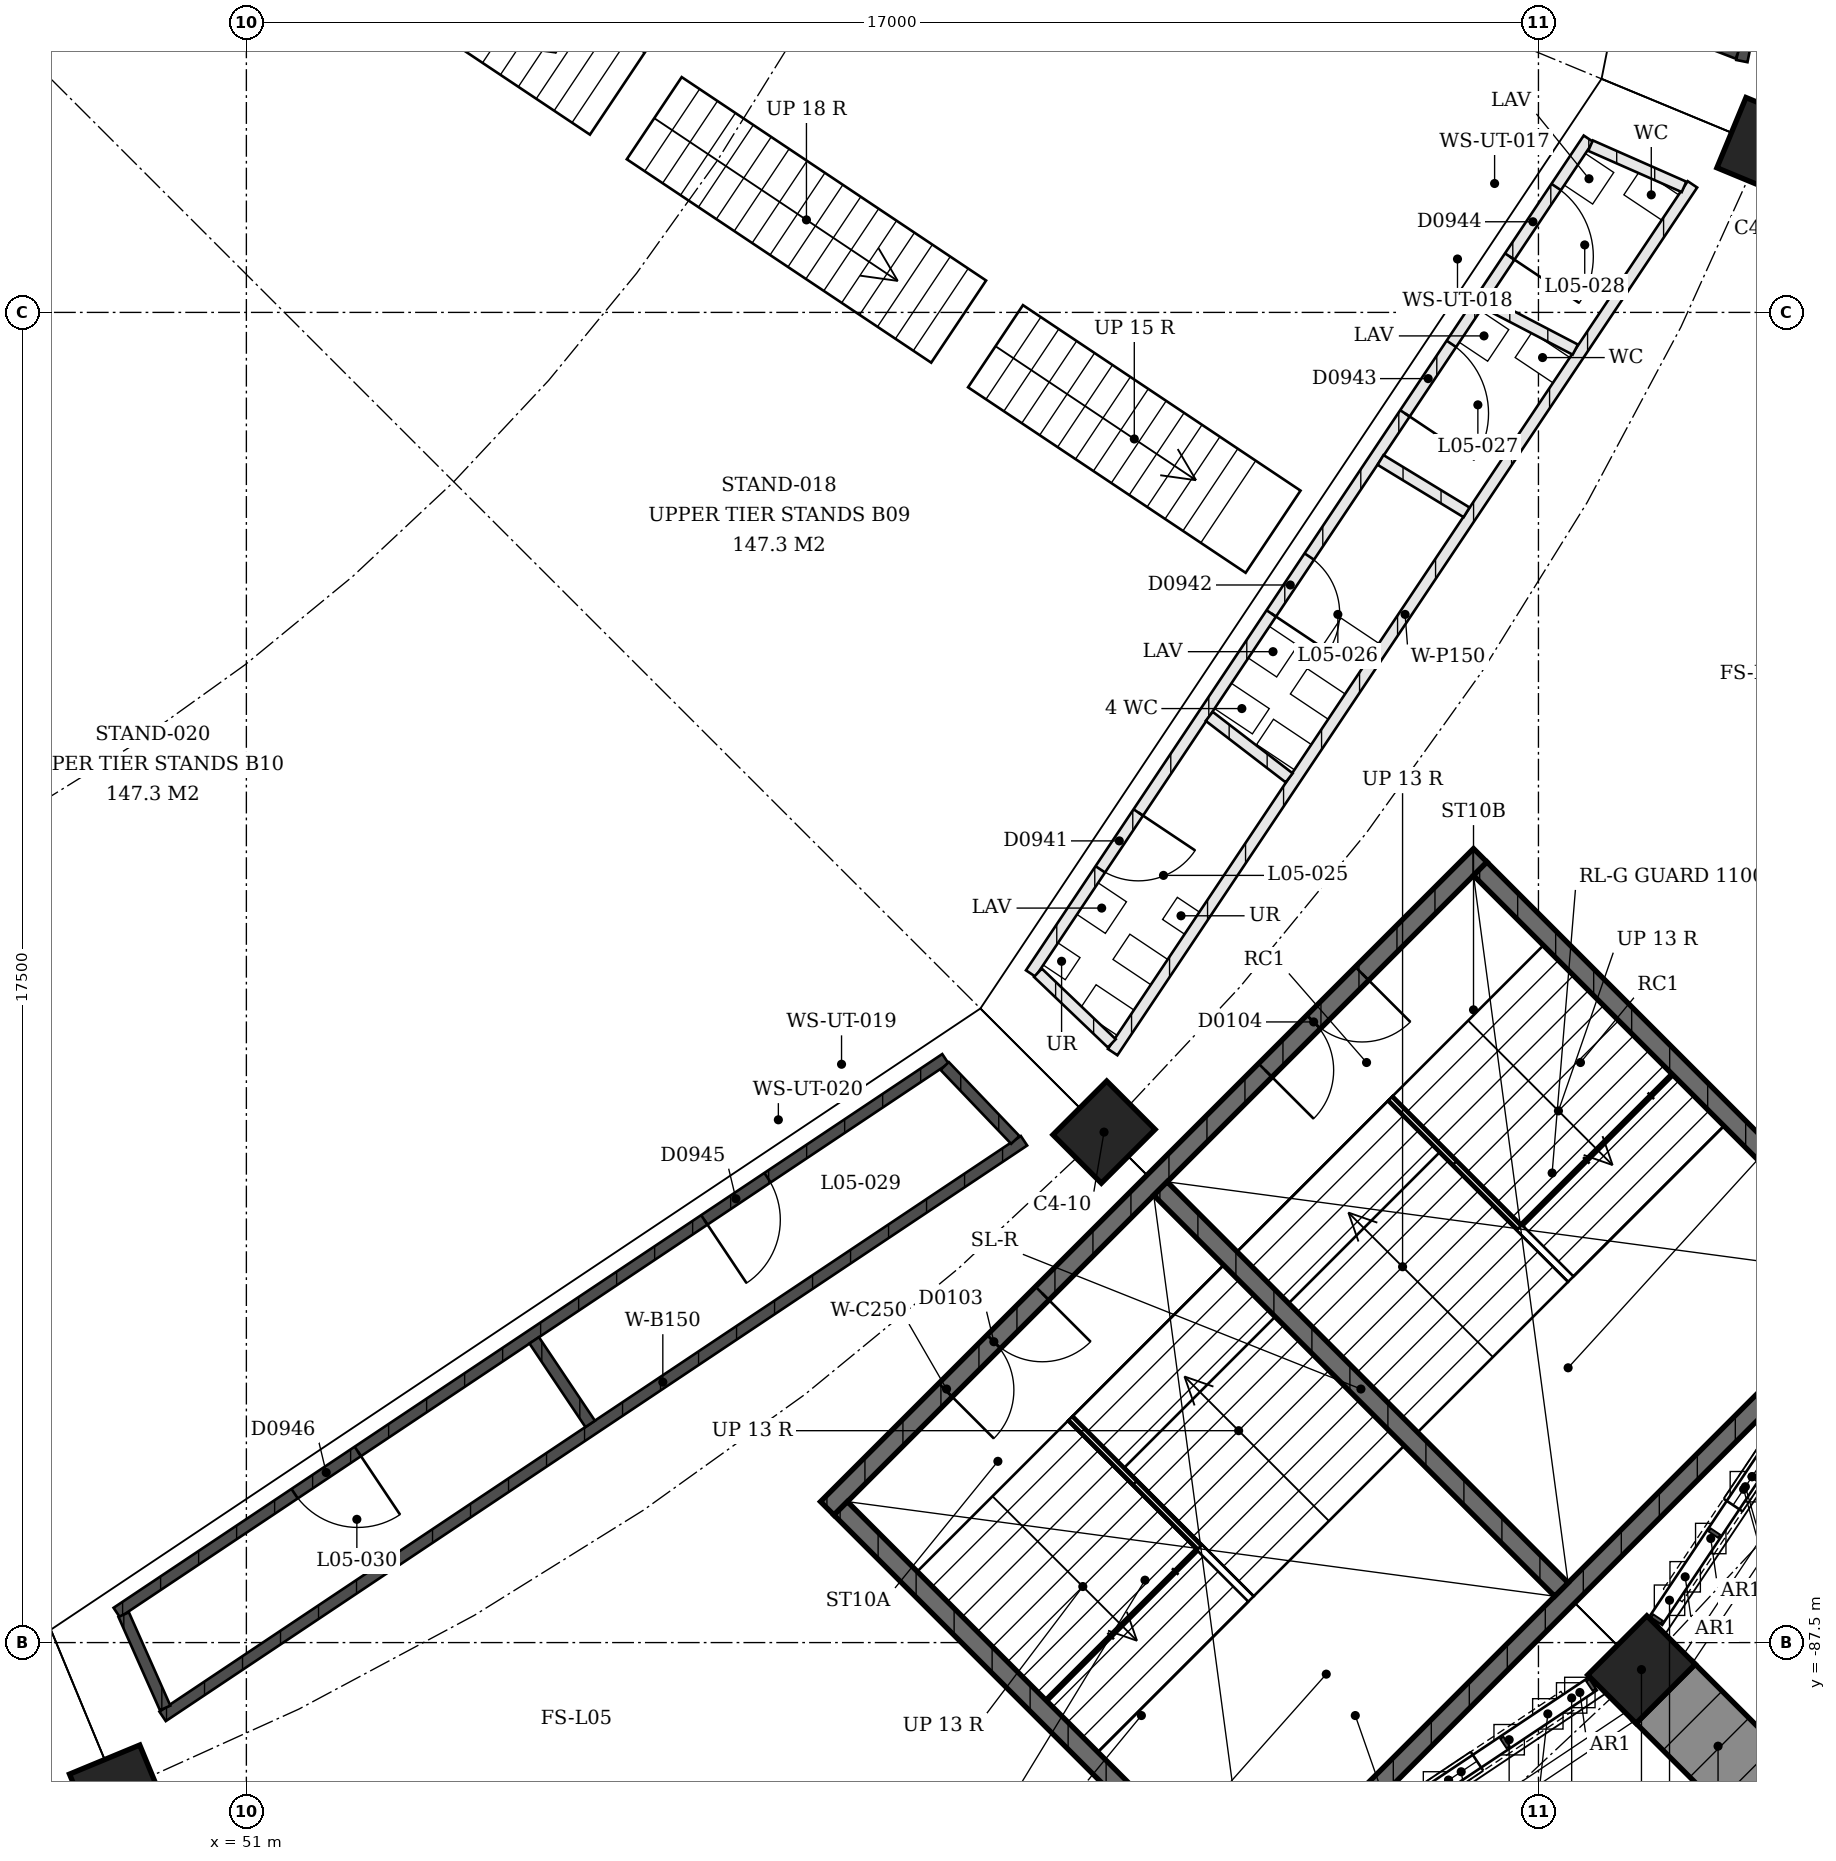
"""IFC4 building model, lengths in metres.
Left out: names, types, materials, properties, quantities, classifications, styles, units other than length and angle.
Written with IfcOpenShell. Run it as: python <this file> out.ifc"""

import sys

from ifc_helpers import new_model, si_unit, direction, frame, frame_2d, origin, origin_2d, place, context, subcontext, project, spatial, polyline, rectangle, outline, extrude, element, fill, save


model = new_model("IFC4")
c1 = context("Model", 3, precision=1e-05, world=origin(), true_north=direction((0.0, 1.0)))
c2 = subcontext(c1, "Body", "Model", "MODEL_VIEW")
j1 = project(units=[si_unit("LENGTHUNIT", "METRE"), si_unit("PLANEANGLEUNIT", "RADIAN")], contexts=[c1])
p1 = place(None, origin())
s1 = spatial("IfcSite", under=j1, at=p1, CompositionType="ELEMENT")
p2 = place(p1, origin())
s2 = spatial("IfcBuilding", under=s1, at=p2, CompositionType="ELEMENT")
p3 = place(p2, frame((0.0, 0.0, 22.5)))
s3 = spatial("IfcBuildingStorey", under=s2, at=p3, CompositionType="ELEMENT", Elevation=22.5)
for number, where, z_axis, x_axis in (
    (1, (70.955, -67.807, 0.0), (0.0, 0.0, 1.0), (0.383, 0.924, 0.0)),
    (2, (62.284, -80.784, 0.0), (0.0, 0.0, 1.0), (0.707, 0.707, 0.0)),
):
    element("IfcColumn", number, at=place(p3, frame(where, z_axis=z_axis, x_axis=x_axis)), inside=s3, PredefinedType="COLUMN", context=c2, shape_type="SweptSolid", body=[
        extrude(rectangle(XDim=1.0, YDim=0.9, at=origin_2d()), origin(), (0.0, 0.0, 1.0), 6.5),
    ])
p4 = place(p3, frame((69.355, -87.855, 0.0), z_axis=(0.0, 0.0, 1.0), x_axis=(0.707106781187, 0.707106781187, 0.0)))
e3 = element("IfcColumn", 3, at=p4, inside=s3, PredefinedType="COLUMN", context=c2, shape_type="SweptSolid", body=[
    extrude(rectangle(XDim=1.1, YDim=0.9, at=origin_2d()), origin(), (0.0, 0.0, 1.0), 6.5),
])
p5 = place(p3, frame((49.307, -89.455, 0.0), z_axis=(0.0, 0.0, 1.0), x_axis=(0.923879532511, 0.382683432365, 0.0)))
e4 = element("IfcColumn", 4, at=p5, inside=s3, PredefinedType="COLUMN", context=c2, shape_type="SweptSolid", body=[
    extrude(rectangle(XDim=1.0, YDim=0.9, at=origin_2d()), origin(), (0.0, 0.0, 1.0), 6.5),
])
p6 = place(p3, frame((71.854, -83.755, 4.1), z_axis=(0.0, 0.0, 1.0), x_axis=(-0.555554703021, -0.831479988906, 0.0)))
e5 = element("IfcWall", 5, at=p6, inside=s3, PredefinedType="SOLIDWALL", context=c2, shape_type="SweptSolid", body=[
    extrude(outline(polyline([(0.0, 0.0), (3.757, 0.0), (3.757, 0.05), (3.635, 1.311), (3.271, 2.577), (2.678, 3.754), (1.879, 4.8), (1.079, 3.754), (0.486, 2.577), (0.123, 1.311), (0.0, 0.05), (0.0, 0.0)])), frame((0.0, 0.15, 0.0), z_axis=(0.0, -1.0, 0.0), x_axis=(1.0, 0.0, 0.0)), (0.0, 0.0, 1.0), 0.3),
])
p7 = place(p6, frame((1.428, 0.0, 0.4)))
e6 = element("IfcOpeningElement", 6, at=p7, cuts=e5, PredefinedType="OPENING", context=c2, shape_type="SweptSolid", body=[
    extrude(rectangle(XDim=0.9, YDim=3.6, at=frame_2d((0.45, 1.8))), frame((0.0, 0.16, 0.0), z_axis=(0.0, -1.0, 0.0), x_axis=(1.0, 0.0, 0.0)), (0.0, 0.0, 1.0), 0.32),
])
p8 = place(p3, frame((68.379, -88.267, 4.1), z_axis=(0.0, 0.0, 1.0), x_axis=(-0.831479988906, -0.555554703021, 0.0)))
e7 = element("IfcWall", 7, at=p8, inside=s3, PredefinedType="SOLIDWALL", context=c2, shape_type="SweptSolid", body=[
    extrude(outline(polyline([(0.0, 0.0), (3.757, 0.0), (3.757, 0.05), (3.635, 1.311), (3.271, 2.577), (2.678, 3.754), (1.879, 4.8), (1.079, 3.754), (0.486, 2.577), (0.123, 1.311), (0.0, 0.05), (0.0, 0.0)])), frame((0.0, 0.15, 0.0), z_axis=(0.0, -1.0, 0.0), x_axis=(1.0, 0.0, 0.0)), (0.0, 0.0, 1.0), 0.3),
])
p9 = place(p8, frame((1.428, 0.0, 0.4)))
e8 = element("IfcOpeningElement", 8, at=p9, cuts=e7, PredefinedType="OPENING", context=c2, shape_type="SweptSolid", body=[
    extrude(rectangle(XDim=0.9, YDim=3.6, at=frame_2d((0.45, 1.8))), frame((0.0, 0.16, 0.0), z_axis=(0.0, -1.0, 0.0), x_axis=(1.0, 0.0, 0.0)), (0.0, 0.0, 1.0), 0.32),
])
p10 = place(p3, frame((58.643, -85.734, 0.0), z_axis=(0.0, 0.0, 1.0), x_axis=(0.707106781187, 0.707106781187, 0.0)))
e9 = element("IfcWall", 9, at=p10, inside=s3, PredefinedType="SHEAR", context=c2, shape_type="SweptSolid", body=[
    extrude(rectangle(XDim=12.15, YDim=0.25, at=frame_2d((6.075, 0.0))), origin(), (0.0, 0.0, 1.0), 2.1),
])
p11 = place(p10, frame((2.2, 0.0, 0.0)))
e10 = element("IfcOpeningElement", 10, at=p11, cuts=e9, PredefinedType="OPENING", context=c2, shape_type="SweptSolid", body=[
    extrude(rectangle(XDim=1.8, YDim=2.1, at=frame_2d((0.9, 1.05))), frame((0.0, 0.125, 0.0), z_axis=(0.0, -1.0, 0.0), x_axis=(1.0, 0.0, 0.0)), (0.0, 0.0, 1.0), 0.25),
])
p12 = place(p10, frame((8.15, 0.0, 0.0)))
e11 = element("IfcOpeningElement", 11, at=p12, cuts=e9, PredefinedType="OPENING", context=c2, shape_type="SweptSolid", body=[
    extrude(rectangle(XDim=1.8, YDim=2.1, at=frame_2d((0.9, 1.05))), frame((0.0, 0.125, 0.0), z_axis=(0.0, -1.0, 0.0), x_axis=(1.0, 0.0, 0.0)), (0.0, 0.0, 1.0), 0.25),
])
p13 = place(p3, frame((64.094, -91.186, 0.0), z_axis=(0.0, 0.0, 1.0), x_axis=(0.707106781187, 0.707106781187, 0.0)))
e12 = element("IfcWall", 12, at=p13, inside=s3, PredefinedType="SHEAR", context=c2, shape_type="SweptSolid", body=[
    extrude(rectangle(XDim=12.15, YDim=0.25, at=frame_2d((6.075, 0.0))), origin(), (0.0, 0.0, 1.0), 2.1),
])
for number, where, z_axis, x_axis in (
    (13, (58.819, -85.734, 0.0), (0.0, 0.0, 1.0), (0.707, -0.707, 0.0)),
    (14, (67.234, -77.319, 0.0), (0.0, 0.0, 1.0), (0.707, -0.707, 0.0)),
):
    element("IfcWall", number, at=place(p3, frame(where, z_axis=z_axis, x_axis=x_axis)), inside=s3, PredefinedType="SHEAR", context=c2, shape_type="SweptSolid", body=[
        extrude(rectangle(XDim=7.46, YDim=0.25, at=frame_2d((3.73, 0.0))), origin(), (0.0, 0.0, 1.0), 2.1),
    ])
p14 = place(p3, frame((63.027, -81.527, 0.0), z_axis=(0.0, 0.0, 1.0), x_axis=(0.707106781187, -0.707106781187, 0.0)))
e15 = element("IfcWall", 15, at=p14, inside=s3, PredefinedType="SHEAR", context=c2, shape_type="SweptSolid", body=[
    extrude(rectangle(XDim=7.46, YDim=0.25, at=frame_2d((3.73, 0.0))), origin(), (0.0, 0.0, 1.0), 2.1),
])
p15 = place(p3, frame((73.336, -53.325, 0.0), z_axis=(0.0, 0.0, 1.0), x_axis=(-0.195086146928, -0.980786110871, 0.0)))
e16 = element("IfcWall", 16, at=p15, inside=s3, PredefinedType="SOLIDWALL", context=c2, shape_type="SweptSolid", body=[
    extrude(rectangle(XDim=13.631, YDim=0.15, at=frame_2d((6.815, 0.0))), origin(), (0.0, 0.0, 1.0), 3.0),
])
p16 = place(p3, frame((69.368, -66.109, 0.0), z_axis=(0.0, 0.0, 1.0), x_axis=(0.933331557443, -0.359015603953, 0.0)))
e17 = element("IfcWall", 17, at=p16, inside=s3, PredefinedType="SOLIDWALL", context=c2, shape_type="SweptSolid", body=[
    extrude(rectangle(XDim=1.344, YDim=0.15, at=frame_2d((0.672, 0.0))), origin(), (0.0, 0.0, 1.0), 3.0),
])
p17 = place(p3, frame((61.32, -78.697, 0.0), z_axis=(0.0, 0.0, 1.0), x_axis=(0.555570028225, 0.831469749142, 0.0)))
e18 = element("IfcWall", 18, at=p17, inside=s3, PredefinedType="PARTITIONING", context=c2, shape_type="SweptSolid", body=[
    extrude(rectangle(XDim=13.209, YDim=0.15, at=frame_2d((6.604, 0.0))), origin(), (0.0, 0.0, 1.0), 3.0),
])
p18 = place(p17, frame((1.648, 0.0, 0.0)))
e19 = element("IfcOpeningElement", 19, at=p18, cuts=e18, PredefinedType="OPENING", context=c2, shape_type="SweptSolid", body=[
    extrude(rectangle(XDim=0.9, YDim=2.1, at=frame_2d((0.45, 1.05))), frame((0.0, 0.075, 0.0), z_axis=(0.0, -1.0, 0.0), x_axis=(1.0, 0.0, 0.0)), (0.0, 0.0, 1.0), 0.15),
])
p19 = place(p17, frame((5.697, 0.0, 0.0)))
e20 = element("IfcOpeningElement", 20, at=p19, cuts=e18, PredefinedType="OPENING", context=c2, shape_type="SweptSolid", body=[
    extrude(rectangle(XDim=0.9, YDim=2.1, at=frame_2d((0.45, 1.05))), frame((0.0, 0.075, 0.0), z_axis=(0.0, -1.0, 0.0), x_axis=(1.0, 0.0, 0.0)), (0.0, 0.0, 1.0), 0.15),
])
p20 = place(p17, frame((8.863, 0.0, 0.0)))
e21 = element("IfcOpeningElement", 21, at=p20, cuts=e18, PredefinedType="OPENING", context=c2, shape_type="SweptSolid", body=[
    extrude(rectangle(XDim=1.1, YDim=2.1, at=frame_2d((0.55, 1.05))), frame((0.0, 0.075, 0.0), z_axis=(0.0, -1.0, 0.0), x_axis=(1.0, 0.0, 0.0)), (0.0, 0.0, 1.0), 0.15),
])
p21 = place(p17, frame((11.344, 0.0, 0.0)))
e22 = element("IfcOpeningElement", 22, at=p21, cuts=e18, PredefinedType="OPENING", context=c2, shape_type="SweptSolid", body=[
    extrude(rectangle(XDim=1.1, YDim=2.1, at=frame_2d((0.55, 1.05))), frame((0.0, 0.075, 0.0), z_axis=(0.0, -1.0, 0.0), x_axis=(1.0, 0.0, 0.0)), (0.0, 0.0, 1.0), 0.15),
])
p22 = place(p3, frame((62.398, -79.731, 0.0), z_axis=(0.0, 0.0, 1.0), x_axis=(0.555573905052, 0.831467158717, 0.0)))
e23 = element("IfcWall", 23, at=p22, inside=s3, PredefinedType="PARTITIONING", context=c2, shape_type="SweptSolid", body=[
    extrude(rectangle(XDim=13.73, YDim=0.15, at=frame_2d((6.865, 0.0))), origin(), (0.0, 0.0, 1.0), 3.0),
])
p23 = place(p3, frame((61.414, -78.688, 0.0), z_axis=(0.0, 0.0, 1.0), x_axis=(0.723174104738, -0.690665776072, 0.0)))
e24 = element("IfcWall", 24, at=p23, inside=s3, PredefinedType="PARTITIONING", context=c2, shape_type="SweptSolid", body=[
    extrude(rectangle(XDim=1.344, YDim=0.15, at=frame_2d((0.672, 0.0))), origin(), (0.0, 0.0, 1.0), 3.0),
])
p24 = place(p3, frame((63.668, -75.314, 0.0), z_axis=(0.0, 0.0, 1.0), x_axis=(0.792767594219, -0.609524028695, 0.0)))
e25 = element("IfcWall", 25, at=p24, inside=s3, PredefinedType="PARTITIONING", context=c2, shape_type="SweptSolid", body=[
    extrude(rectangle(XDim=1.327, YDim=0.15, at=frame_2d((0.664, 0.0))), origin(), (0.0, 0.0, 1.0), 3.0),
])
p25 = place(p3, frame((65.922, -71.941, 0.0), z_axis=(0.0, 0.0, 1.0), x_axis=(0.854109602484, -0.520093056043, 0.0)))
e26 = element("IfcWall", 26, at=p25, inside=s3, PredefinedType="PARTITIONING", context=c2, shape_type="SweptSolid", body=[
    extrude(rectangle(XDim=1.325, YDim=0.15, at=frame_2d((0.663, 0.0))), origin(), (0.0, 0.0, 1.0), 3.0),
])
p26 = place(p3, frame((67.304, -69.874, 0.0), z_axis=(0.0, 0.0, 1.0), x_axis=(0.886633867097, -0.462472037768, 0.0)))
e27 = element("IfcWall", 27, at=p26, inside=s3, PredefinedType="PARTITIONING", context=c2, shape_type="SweptSolid", body=[
    extrude(rectangle(XDim=1.332, YDim=0.15, at=frame_2d((0.666, 0.0))), origin(), (0.0, 0.0, 1.0), 3.0),
])
p27 = place(p3, frame((68.685, -67.806, 0.0), z_axis=(0.0, 0.0, 1.0), x_axis=(0.914894130368, -0.403693857048, 0.0)))
e28 = element("IfcWall", 28, at=p27, inside=s3, PredefinedType="PARTITIONING", context=c2, shape_type="SweptSolid", body=[
    extrude(rectangle(XDim=1.344, YDim=0.15, at=frame_2d((0.672, 0.0))), origin(), (0.0, 0.0, 1.0), 3.0),
])
p28 = place(p3, frame((60.197, -79.82, 0.0), z_axis=(0.0, 0.0, 1.0), x_axis=(-0.831471244595, -0.555567790114, 0.0)))
e29 = element("IfcWall", 29, at=p28, inside=s3, PredefinedType="SOLIDWALL", context=c2, shape_type="SweptSolid", body=[
    extrude(rectangle(XDim=13.113, YDim=0.15, at=frame_2d((6.557, 0.0))), origin(), (0.0, 0.0, 1.0), 3.0),
])
p29 = place(p28, frame((2.815, 0.0, 0.0)))
e30 = element("IfcOpeningElement", 30, at=p29, cuts=e29, PredefinedType="OPENING", context=c2, shape_type="SweptSolid", body=[
    extrude(rectangle(XDim=1.0, YDim=2.1, at=frame_2d((0.5, 1.05))), frame((0.0, 0.075, 0.0), z_axis=(0.0, -1.0, 0.0), x_axis=(1.0, 0.0, 0.0)), (0.0, 0.0, 1.0), 0.15),
])
p30 = place(p28, frame((9.298, 0.0, 0.0)))
e31 = element("IfcOpeningElement", 31, at=p30, cuts=e29, PredefinedType="OPENING", context=c2, shape_type="SweptSolid", body=[
    extrude(rectangle(XDim=1.0, YDim=2.1, at=frame_2d((0.5, 1.05))), frame((0.0, 0.075, 0.0), z_axis=(0.0, -1.0, 0.0), x_axis=(1.0, 0.0, 0.0)), (0.0, 0.0, 1.0), 0.15),
])
p31 = place(p3, frame((61.231, -80.898, 0.0), z_axis=(0.0, 0.0, 1.0), x_axis=(-0.831471173823, -0.555567896033, 0.0)))
e32 = element("IfcWall", 32, at=p31, inside=s3, PredefinedType="SOLIDWALL", context=c2, shape_type="SweptSolid", body=[
    extrude(rectangle(XDim=13.631, YDim=0.15, at=frame_2d((6.815, 0.0))), origin(), (0.0, 0.0, 1.0), 3.0),
])
p32 = place(p3, frame((60.188, -79.914, 0.0), z_axis=(0.0, 0.0, 1.0), x_axis=(0.690665776072, -0.723174104738, 0.0)))
e33 = element("IfcWall", 33, at=p32, inside=s3, PredefinedType="SOLIDWALL", context=c2, shape_type="SweptSolid", body=[
    extrude(rectangle(XDim=1.344, YDim=0.15, at=frame_2d((0.672, 0.0))), origin(), (0.0, 0.0, 1.0), 3.0),
])
p33 = place(p3, frame((54.787, -83.523, 0.0), z_axis=(0.0, 0.0, 1.0), x_axis=(0.556613340271, -0.830771683095, 0.0)))
e34 = element("IfcWall", 34, at=p33, inside=s3, PredefinedType="SOLIDWALL", context=c2, shape_type="SweptSolid", body=[
    extrude(rectangle(XDim=1.324, YDim=0.15, at=frame_2d((0.662, 0.0))), origin(), (0.0, 0.0, 1.0), 3.0),
])
p34 = place(p3, frame((49.386, -87.132, 0.0), z_axis=(0.0, 0.0, 1.0), x_axis=(0.405902438759, -0.913916413142, 0.0)))
e35 = element("IfcWall", 35, at=p34, inside=s3, PredefinedType="SOLIDWALL", context=c2, shape_type="SweptSolid", body=[
    extrude(rectangle(XDim=1.344, YDim=0.15, at=frame_2d((0.672, 0.0))), origin(), (0.0, 0.0, 1.0), 3.0),
])
p35 = place(p7, origin())
e36 = element("IfcWindow", 36, at=p35, inside=s3, PartitioningType="SINGLE_PANEL", PredefinedType="WINDOW", context=c2, shape_type="SweptSolid", body=[
    extrude(rectangle(XDim=0.9, YDim=3.6, at=frame_2d((0.45, 1.8))), frame((0.0, 0.03, 0.0), z_axis=(0.0, -1.0, 0.0), x_axis=(1.0, 0.0, 0.0)), (0.0, 0.0, 1.0), 0.06),
])
fill(e6, e36)
p36 = place(p9, origin())
e37 = element("IfcWindow", 37, at=p36, inside=s3, PartitioningType="SINGLE_PANEL", PredefinedType="WINDOW", context=c2, shape_type="SweptSolid", body=[
    extrude(rectangle(XDim=0.9, YDim=3.6, at=frame_2d((0.45, 1.8))), frame((0.0, 0.03, 0.0), z_axis=(0.0, -1.0, 0.0), x_axis=(1.0, 0.0, 0.0)), (0.0, 0.0, 1.0), 0.06),
])
fill(e8, e37)
p37 = place(p11, origin())
e38 = element("IfcDoor", 38, at=p37, inside=s3, OperationType="DOUBLE_DOOR_SINGLE_SWING", PredefinedType="DOOR", context=c2, shape_type="SweptSolid", body=[
    extrude(rectangle(XDim=1.8, YDim=2.1, at=frame_2d((0.9, 1.05))), frame((0.0, 0.025, 0.0), z_axis=(0.0, -1.0, 0.0), x_axis=(1.0, 0.0, 0.0)), (0.0, 0.0, 1.0), 0.05),
])
fill(e10, e38)
p38 = place(p12, origin())
e39 = element("IfcDoor", 39, at=p38, inside=s3, OperationType="DOUBLE_DOOR_SINGLE_SWING", PredefinedType="DOOR", context=c2, shape_type="SweptSolid", body=[
    extrude(rectangle(XDim=1.8, YDim=2.1, at=frame_2d((0.9, 1.05))), frame((0.0, 0.025, 0.0), z_axis=(0.0, -1.0, 0.0), x_axis=(1.0, 0.0, 0.0)), (0.0, 0.0, 1.0), 0.05),
])
fill(e11, e39)
p39 = place(p18, origin())
e40 = element("IfcDoor", 40, at=p39, inside=s3, OperationType="SINGLE_SWING_RIGHT", PredefinedType="DOOR", context=c2, shape_type="SweptSolid", body=[
    extrude(rectangle(XDim=0.9, YDim=2.1, at=frame_2d((0.45, 1.05))), frame((0.0, 0.025, 0.0), z_axis=(0.0, -1.0, 0.0), x_axis=(1.0, 0.0, 0.0)), (0.0, 0.0, 1.0), 0.05),
])
fill(e19, e40)
p40 = place(p19, origin())
e41 = element("IfcDoor", 41, at=p40, inside=s3, OperationType="SINGLE_SWING_LEFT", PredefinedType="DOOR", context=c2, shape_type="SweptSolid", body=[
    extrude(rectangle(XDim=0.9, YDim=2.1, at=frame_2d((0.45, 1.05))), frame((0.0, 0.025, 0.0), z_axis=(0.0, -1.0, 0.0), x_axis=(1.0, 0.0, 0.0)), (0.0, 0.0, 1.0), 0.05),
])
fill(e20, e41)
p41 = place(p20, origin())
e42 = element("IfcDoor", 42, at=p41, inside=s3, OperationType="SINGLE_SWING_LEFT", PredefinedType="DOOR", context=c2, shape_type="SweptSolid", body=[
    extrude(rectangle(XDim=1.1, YDim=2.1, at=frame_2d((0.55, 1.05))), frame((0.0, 0.025, 0.0), z_axis=(0.0, -1.0, 0.0), x_axis=(1.0, 0.0, 0.0)), (0.0, 0.0, 1.0), 0.05),
])
fill(e21, e42)
p42 = place(p21, origin())
e43 = element("IfcDoor", 43, at=p42, inside=s3, OperationType="SINGLE_SWING_LEFT", PredefinedType="DOOR", context=c2, shape_type="SweptSolid", body=[
    extrude(rectangle(XDim=1.1, YDim=2.1, at=frame_2d((0.55, 1.05))), frame((0.0, 0.025, 0.0), z_axis=(0.0, -1.0, 0.0), x_axis=(1.0, 0.0, 0.0)), (0.0, 0.0, 1.0), 0.05),
])
fill(e22, e43)
p43 = place(p29, origin())
e44 = element("IfcDoor", 44, at=p43, inside=s3, OperationType="SINGLE_SWING_LEFT", PredefinedType="DOOR", context=c2, shape_type="SweptSolid", body=[
    extrude(rectangle(XDim=1.0, YDim=2.1, at=frame_2d((0.5, 1.05))), frame((0.0, 0.025, 0.0), z_axis=(0.0, -1.0, 0.0), x_axis=(1.0, 0.0, 0.0)), (0.0, 0.0, 1.0), 0.05),
])
fill(e30, e44)
p44 = place(p30, origin())
e45 = element("IfcDoor", 45, at=p44, inside=s3, OperationType="SINGLE_SWING_RIGHT", PredefinedType="DOOR", context=c2, shape_type="SweptSolid", body=[
    extrude(rectangle(XDim=1.0, YDim=2.1, at=frame_2d((0.5, 1.05))), frame((0.0, 0.025, 0.0), z_axis=(0.0, -1.0, 0.0), x_axis=(1.0, 0.0, 0.0)), (0.0, 0.0, 1.0), 0.05),
])
fill(e31, e45)
save(model, sys.argv[1])
